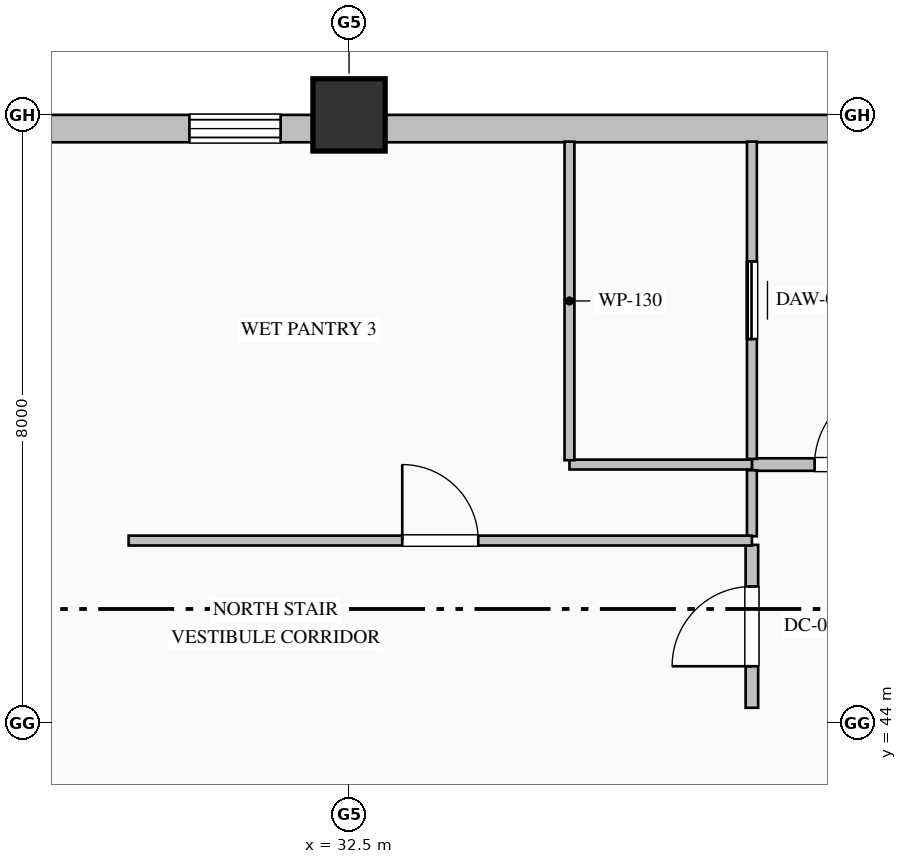
"""IFC4 building model, lengths in metres.
Left out: names, types, materials, properties, quantities, classifications, styles, units other than length and angle.
Written with IfcOpenShell. Run it as: python <this file> out.ifc"""

import sys

from ifc_helpers import new_model, si_unit, direction, frame, frame_2d, origin, origin_2d, place, context, subcontext, project, spatial, rectangle, hollow_rectangle, extrude, element, fill, save


model = new_model("IFC4")
c1 = context("Model", 3, precision=1e-05, world=origin(), true_north=direction((0.0, 1.0)))
c2 = subcontext(c1, "Body", "Model", "MODEL_VIEW")
j1 = project(units=[si_unit("LENGTHUNIT", "METRE"), si_unit("PLANEANGLEUNIT", "RADIAN")], contexts=[c1])
p1 = place(None, origin())
s1 = spatial("IfcSite", under=j1, at=p1, CompositionType="ELEMENT")
p2 = place(p1, origin())
s2 = spatial("IfcBuilding", under=s1, at=p2, CompositionType="ELEMENT")
p3 = place(p2, frame((0.0, 0.0, 225.8)))
s3 = spatial("IfcBuildingStorey", under=s2, at=p3, CompositionType="ELEMENT", Elevation=225.8)
p4 = place(p3, frame((32.5, 52.0, 0.0), z_axis=(0.0, 0.0, 1.0), x_axis=(1.0, 0.0, 0.0)))
e1 = element("IfcColumn", 1, at=p4, inside=s3, PredefinedType="COLUMN", context=c2, shape_type="SweptSolid", body=[
    extrude(hollow_rectangle(XDim=0.95, YDim=0.95, WallThickness=0.036, at=origin_2d()), origin(), (0.0, 0.0, 1.0), 4.0),
])
p5 = place(p3, frame((13.0, 51.82, 0.0), z_axis=(0.0, 0.0, 1.0), x_axis=(1.0, 0.0, 0.0)))
e2 = element("IfcWall", 2, at=p5, inside=s3, PredefinedType="SOLIDWALL", context=c2, shape_type="SweptSolid", body=[
    extrude(rectangle(XDim=27.52, YDim=0.36, at=frame_2d((13.76, 0.0))), origin(), (0.0, 0.0, 1.0), 3.325),
])
p6 = place(p5, frame((6.6, 0.0, 0.9)))
e3 = element("IfcOpeningElement", 3, at=p6, cuts=e2, PredefinedType="OPENING", context=c2, shape_type="SweptSolid", body=[
    extrude(rectangle(XDim=1.2, YDim=1.85, at=frame_2d((0.6, 0.925))), frame((0.0, 0.19, 0.0), z_axis=(0.0, -1.0, 0.0), x_axis=(1.0, 0.0, 0.0)), (0.0, 0.0, 1.0), 0.38),
])
p7 = place(p5, frame((17.4, 0.0, 0.9)))
e4 = element("IfcOpeningElement", 4, at=p7, cuts=e2, PredefinedType="OPENING", context=c2, shape_type="SweptSolid", body=[
    extrude(rectangle(XDim=1.2, YDim=1.85, at=frame_2d((0.6, 0.925))), frame((0.0, 0.19, 0.0), z_axis=(0.0, -1.0, 0.0), x_axis=(1.0, 0.0, 0.0)), (0.0, 0.0, 1.0), 0.38),
])
p8 = place(p3, frame((37.8, 47.4, 0.0), z_axis=(0.0, 0.0, 1.0), x_axis=(1.0, 0.0, 0.0)))
e5 = element("IfcWall", 5, at=p8, inside=s3, PredefinedType="PARTITIONING", context=c2, shape_type="SweptSolid", body=[
    extrude(rectangle(XDim=2.7, YDim=0.165, at=frame_2d((1.35, 0.0))), origin(), (0.0, 0.0, 1.0), 3.775),
])
p9 = place(p8, frame((0.825, 0.0, 0.0)))
e6 = element("IfcOpeningElement", 6, at=p9, cuts=e5, PredefinedType="OPENING", context=c2, shape_type="SweptSolid", body=[
    extrude(rectangle(XDim=1.05, YDim=2.15, at=frame_2d((0.525, 1.075))), frame((0.0, 0.093, 0.0), z_axis=(0.0, -1.0, 0.0), x_axis=(1.0, 0.0, 0.0)), (0.0, 0.0, 1.0), 0.185),
])
p10 = place(p3, frame((37.8, 44.2, 0.0), z_axis=(0.0, 0.0, 1.0), x_axis=(0.0, 1.0, 0.0)))
e7 = element("IfcWall", 7, at=p10, inside=s3, PredefinedType="PARTITIONING", context=c2, shape_type="SweptSolid", body=[
    extrude(rectangle(XDim=2.143, YDim=0.165, at=frame_2d((1.072, 0.0))), origin(), (0.0, 0.0, 1.0), 3.775),
])
p11 = place(p10, frame((0.546, 0.0, 0.0)))
e8 = element("IfcOpeningElement", 8, at=p11, cuts=e7, PredefinedType="OPENING", context=c2, shape_type="SweptSolid", body=[
    extrude(rectangle(XDim=1.05, YDim=2.15, at=frame_2d((0.525, 1.075))), frame((0.0, 0.093, 0.0), z_axis=(0.0, -1.0, 0.0), x_axis=(1.0, 0.0, 0.0)), (0.0, 0.0, 1.0), 0.185),
])
p12 = place(p3, frame((37.8, 46.457, 0.0), z_axis=(0.0, 0.0, 1.0), x_axis=(0.0, 1.0, 0.0)))
e9 = element("IfcWall", 9, at=p12, inside=s3, PredefinedType="PARTITIONING", context=c2, shape_type="SweptSolid", body=[
    extrude(rectangle(XDim=0.868, YDim=0.13, at=frame_2d((0.434, 0.0))), origin(), (0.0, 0.0, 1.0), 3.775),
])
p13 = place(p3, frame((37.8, 47.475, 0.0), z_axis=(0.0, 0.0, 1.0), x_axis=(0.0, 1.0, 0.0)))
e10 = element("IfcWall", 10, at=p13, inside=s3, PredefinedType="PARTITIONING", context=c2, shape_type="SweptSolid", body=[
    extrude(rectangle(XDim=4.173, YDim=0.13, at=frame_2d((2.087, 0.0))), origin(), (0.0, 0.0, 1.0), 3.775),
])
p14 = place(p13, frame((1.577, 0.0, 0.0)))
e11 = element("IfcOpeningElement", 11, at=p14, cuts=e10, PredefinedType="OPENING", context=c2, shape_type="SweptSolid", body=[
    extrude(rectangle(XDim=1.02, YDim=2.15, at=frame_2d((0.51, 1.075))), frame((0.0, 0.075, 0.0), z_axis=(0.0, -1.0, 0.0), x_axis=(1.0, 0.0, 0.0)), (0.0, 0.0, 1.0), 0.15),
])
p15 = place(p3, frame((37.8, 47.4, 0.0), z_axis=(0.0, 0.0, 1.0), x_axis=(-1.0, 0.0, 0.0)))
e12 = element("IfcWall", 12, at=p15, inside=s3, PredefinedType="PARTITIONING", context=c2, shape_type="SweptSolid", body=[
    extrude(rectangle(XDim=2.4, YDim=0.13, at=frame_2d((1.2, 0.0))), origin(), (0.0, 0.0, 1.0), 3.775),
])
p16 = place(p3, frame((35.4, 47.457, 0.0), z_axis=(0.0, 0.0, 1.0), x_axis=(0.0, 1.0, 0.0)))
e13 = element("IfcWall", 13, at=p16, inside=s3, PredefinedType="PARTITIONING", context=c2, shape_type="SweptSolid", body=[
    extrude(rectangle(XDim=4.191, YDim=0.13, at=frame_2d((2.095, 0.0))), origin(), (0.0, 0.0, 1.0), 3.775),
])
p17 = place(p3, frame((29.6, 46.4, 0.0), z_axis=(0.0, 0.0, 1.0), x_axis=(1.0, 0.0, 0.0)))
e14 = element("IfcWall", 14, at=p17, inside=s3, PredefinedType="PARTITIONING", context=c2, shape_type="SweptSolid", body=[
    extrude(rectangle(XDim=8.2, YDim=0.13, at=frame_2d((4.1, 0.0))), origin(), (0.0, 0.0, 1.0), 3.775),
])
p18 = place(p17, frame((3.6, 0.0, 0.0)))
e15 = element("IfcOpeningElement", 15, at=p18, cuts=e14, PredefinedType="OPENING", context=c2, shape_type="SweptSolid", body=[
    extrude(rectangle(XDim=1.0, YDim=2.15, at=frame_2d((0.5, 1.075))), frame((0.0, 0.075, 0.0), z_axis=(0.0, -1.0, 0.0), x_axis=(1.0, 0.0, 0.0)), (0.0, 0.0, 1.0), 0.15),
])
p19 = place(p7, origin())
e16 = element("IfcWindow", 16, at=p19, inside=s3, PartitioningType="DOUBLE_PANEL_VERTICAL", PredefinedType="WINDOW", context=c2, shape_type="SweptSolid", body=[
    extrude(rectangle(XDim=1.2, YDim=1.85, at=frame_2d((0.6, 0.925))), frame((0.0, 0.15, 0.0), z_axis=(0.0, -1.0, 0.0), x_axis=(1.0, 0.0, 0.0)), (0.0, 0.0, 1.0), 0.06),
])
fill(e4, e16)
p20 = place(p9, origin())
e17 = element("IfcDoor", 17, at=p20, inside=s3, OperationType="SINGLE_SWING_RIGHT", PredefinedType="DOOR", context=c2, shape_type="SweptSolid", body=[
    extrude(rectangle(XDim=1.05, YDim=2.15, at=frame_2d((0.525, 1.075))), frame((0.0, 0.025, 0.0), z_axis=(0.0, -1.0, 0.0), x_axis=(1.0, 0.0, 0.0)), (0.0, 0.0, 1.0), 0.05),
])
fill(e6, e17)
p21 = place(p11, origin())
e18 = element("IfcDoor", 18, at=p21, inside=s3, OperationType="SINGLE_SWING_LEFT", PredefinedType="DOOR", context=c2, shape_type="SweptSolid", body=[
    extrude(rectangle(XDim=1.05, YDim=2.15, at=frame_2d((0.525, 1.075))), frame((0.0, 0.025, 0.0), z_axis=(0.0, -1.0, 0.0), x_axis=(1.0, 0.0, 0.0)), (0.0, 0.0, 1.0), 0.05),
])
fill(e8, e18)
p22 = place(p14, origin())
e19 = element("IfcDoor", 19, at=p22, inside=s3, OperationType="SLIDING_TO_LEFT", PredefinedType="DOOR", context=c2, shape_type="SweptSolid", body=[
    extrude(rectangle(XDim=1.02, YDim=2.15, at=frame_2d((0.51, 1.075))), frame((0.0, 0.025, 0.0), z_axis=(0.0, -1.0, 0.0), x_axis=(1.0, 0.0, 0.0)), (0.0, 0.0, 1.0), 0.05),
])
fill(e11, e19)
p23 = place(p18, origin())
e20 = element("IfcDoor", 20, at=p23, inside=s3, OperationType="SINGLE_SWING_LEFT", PredefinedType="DOOR", context=c2, shape_type="SweptSolid", body=[
    extrude(rectangle(XDim=1.0, YDim=2.15, at=frame_2d((0.5, 1.075))), frame((0.0, 0.025, 0.0), z_axis=(0.0, -1.0, 0.0), x_axis=(1.0, 0.0, 0.0)), (0.0, 0.0, 1.0), 0.05),
])
fill(e15, e20)
save(model, sys.argv[1])
